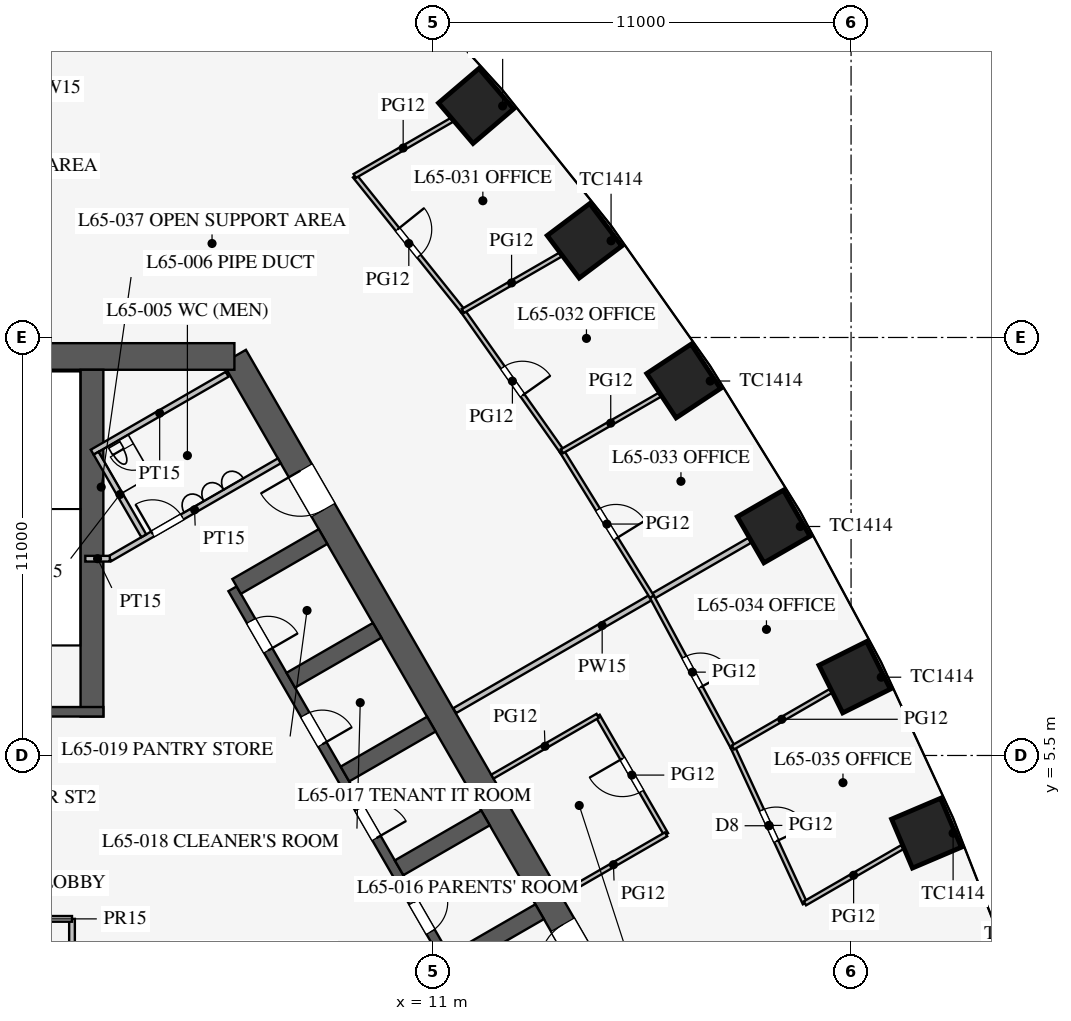
"""IFC4 building model, lengths in metres.
Left out: names, types, materials, properties, quantities, classifications, styles, units other than length and angle.
Written with IfcOpenShell. Run it as: python <this file> out.ifc"""

import sys

from ifc_helpers import new_model, si_unit, direction, frame, frame_2d, origin, origin_2d, place, context, subcontext, project, spatial, rectangle, extrude, element, fill, save


model = new_model("IFC4")
c1 = context("Model", 3, precision=1e-05, world=origin(), true_north=direction((0.0, 1.0)))
c2 = subcontext(c1, "Body", "Model", "MODEL_VIEW")
j1 = project(units=[si_unit("LENGTHUNIT", "METRE"), si_unit("PLANEANGLEUNIT", "RADIAN")], contexts=[c1])
p1 = place(None, origin())
s1 = spatial("IfcSite", under=j1, at=p1, CompositionType="ELEMENT")
p2 = place(p1, origin())
s2 = spatial("IfcBuilding", under=s1, at=p2, CompositionType="ELEMENT")
p3 = place(p2, frame((0.0, 0.0, 284.7)))
s3 = spatial("IfcBuildingStorey", under=s2, at=p3, CompositionType="ELEMENT", Elevation=284.7)
for number, where, z_axis, x_axis in (
    (1, (23.985, 3.455, 0.0), (0.0, 0.0, 1.0), (-0.391, 0.92, 0.0)),
    (2, (22.094, 7.56, 0.0), (0.0, 0.0, 1.0), (-0.447, 0.895, 0.0)),
    (3, (19.963, 11.526, 0.0), (0.0, 0.0, 1.0), (-0.5, 0.866, 0.0)),
    (4, (17.594, 15.354, 0.0), (0.0, 0.0, 1.0), (-0.552, 0.834, 0.0)),
    (5, (14.985, 19.044, 0.0), (0.0, 0.0, 1.0), (-0.601, 0.799, 0.0)),
    (6, (12.132, 22.593, 0.0), (0.0, 0.0, 1.0), (-0.649, 0.761, 0.0)),
):
    element("IfcColumn", number, at=place(p3, frame(where, z_axis=z_axis, x_axis=x_axis)), inside=s3, PredefinedType="COLUMN", context=c2, shape_type="SweptSolid", body=[
        extrude(rectangle(XDim=1.4, YDim=1.4, at=origin_2d()), origin(), (0.0, 0.0, 1.0), 4.2),
    ])
p4 = place(p3, frame((16.743, -3.0, 0.0), z_axis=(0.0, 0.0, 1.0), x_axis=(-0.500002442456, 0.866023993627, 0.0)))
e7 = element("IfcWall", 7, at=p4, inside=s3, PredefinedType="SHEAR", context=c2, shape_type="SweptSolid", body=[
    extrude(rectangle(XDim=21.939, YDim=0.7, at=frame_2d((10.97, 0.0))), origin(), (0.0, 0.0, 1.0), 4.2),
])
p5 = place(p4, frame((17.27, 0.0, 0.0)))
e8 = element("IfcOpeningElement", 8, at=p5, cuts=e7, PredefinedType="OPENING", context=c2, shape_type="SweptSolid", body=[
    extrude(rectangle(XDim=1.2, YDim=2.1, at=frame_2d((0.6, 1.05))), frame((0.0, 0.36, 0.0), z_axis=(0.0, -1.0, 0.0), x_axis=(1.0, 0.0, 0.0)), (0.0, 0.0, 1.0), 0.72),
])
p6 = place(p4, frame((3.47, 0.0, 0.0)))
e9 = element("IfcOpeningElement", 9, at=p6, cuts=e7, PredefinedType="OPENING", context=c2, shape_type="SweptSolid", body=[
    extrude(rectangle(XDim=1.2, YDim=2.1, at=frame_2d((0.6, 1.05))), frame((0.0, 0.36, 0.0), z_axis=(0.0, -1.0, 0.0), x_axis=(1.0, 0.0, 0.0)), (0.0, 0.0, 1.0), 0.72),
])
p7 = place(p3, frame((5.773, 16.0, 0.0), z_axis=(0.0, 0.0, 1.0), x_axis=(-1.0, 0.0, 0.0)))
e10 = element("IfcWall", 10, at=p7, inside=s3, PredefinedType="SHEAR", context=c2, shape_type="SweptSolid", body=[
    extrude(rectangle(XDim=11.547, YDim=0.7, at=frame_2d((5.773, 0.0))), origin(), (0.0, 0.0, 1.0), 4.2),
])
p8 = place(p3, frame((11.424, 0.014, 0.0), z_axis=(0.0, 0.0, 1.0), x_axis=(-0.500001763848, 0.866024385424, 0.0)))
e11 = element("IfcWall", 11, at=p8, inside=s3, PredefinedType="SHEAR", context=c2, shape_type="SweptSolid", body=[
    extrude(rectangle(XDim=11.4, YDim=0.25, at=frame_2d((5.7, 0.0))), origin(), (0.0, 0.0, 1.0), 4.2),
])
p9 = place(p8, frame((0.975, 0.0, 0.0)))
e12 = element("IfcOpeningElement", 12, at=p9, cuts=e11, PredefinedType="OPENING", context=c2, shape_type="SweptSolid", body=[
    extrude(rectangle(XDim=0.9, YDim=2.1, at=frame_2d((0.45, 1.05))), frame((0.0, 0.135, 0.0), z_axis=(0.0, -1.0, 0.0), x_axis=(1.0, 0.0, 0.0)), (0.0, 0.0, 1.0), 0.27),
])
p10 = place(p8, frame((3.825, 0.0, 0.0)))
e13 = element("IfcOpeningElement", 13, at=p10, cuts=e11, PredefinedType="OPENING", context=c2, shape_type="SweptSolid", body=[
    extrude(rectangle(XDim=0.9, YDim=2.1, at=frame_2d((0.45, 1.05))), frame((0.0, 0.135, 0.0), z_axis=(0.0, -1.0, 0.0), x_axis=(1.0, 0.0, 0.0)), (0.0, 0.0, 1.0), 0.27),
])
p11 = place(p8, frame((6.675, 0.0, 0.0)))
e14 = element("IfcOpeningElement", 14, at=p11, cuts=e11, PredefinedType="OPENING", context=c2, shape_type="SweptSolid", body=[
    extrude(rectangle(XDim=0.9, YDim=2.1, at=frame_2d((0.45, 1.05))), frame((0.0, 0.135, 0.0), z_axis=(0.0, -1.0, 0.0), x_axis=(1.0, 0.0, 0.0)), (0.0, 0.0, 1.0), 0.27),
])
p12 = place(p8, frame((9.525, 0.0, 0.0)))
e15 = element("IfcOpeningElement", 15, at=p12, cuts=e11, PredefinedType="OPENING", context=c2, shape_type="SweptSolid", body=[
    extrude(rectangle(XDim=0.9, YDim=2.1, at=frame_2d((0.45, 1.05))), frame((0.0, 0.135, 0.0), z_axis=(0.0, -1.0, 0.0), x_axis=(1.0, 0.0, 0.0)), (0.0, 0.0, 1.0), 0.27),
])
for number, where, z_axis, x_axis in (
    (16, (11.532, 0.076, 0.0), (0.0, 0.0, 1.0), (0.866, 0.5, 0.0)),
    (17, (10.107, 2.544, 0.0), (0.0, 0.0, 1.0), (0.866, 0.5, 0.0)),
    (18, (8.682, 5.012, 0.0), (0.0, 0.0, 1.0), (0.866, 0.5, 0.0)),
    (19, (7.257, 7.481, 0.0), (0.0, 0.0, 1.0), (0.866, 0.5, 0.0)),
    (20, (5.832, 9.949, 0.0), (0.0, 0.0, 1.0), (0.866, 0.5, 0.0)),
):
    element("IfcWall", number, at=place(p3, frame(where, z_axis=z_axis, x_axis=x_axis)), inside=s3, PredefinedType="SHEAR", context=c2, shape_type="SweptSolid", body=[
        extrude(rectangle(XDim=2.625, YDim=0.45, at=frame_2d((1.312, 0.0))), origin(), (0.0, 0.0, 1.0), 4.2),
    ])
p13 = place(p3, frame((2.025, 6.525, 0.0), z_axis=(0.0, 0.0, 1.0), x_axis=(0.0, 1.0, 0.0)))
e21 = element("IfcWall", 21, at=p13, inside=s3, PredefinedType="SHEAR", context=c2, shape_type="SweptSolid", body=[
    extrude(rectangle(XDim=9.125, YDim=0.6, at=frame_2d((4.562, 0.0))), origin(), (0.0, 0.0, 1.0), 4.2),
])
p14 = place(p3, frame((2.325, 6.65, 0.0), z_axis=(0.0, 0.0, 1.0), x_axis=(-1.0, 0.0, 0.0)))
e22 = element("IfcWall", 22, at=p14, inside=s3, PredefinedType="SHEAR", context=c2, shape_type="SweptSolid", body=[
    extrude(rectangle(XDim=4.65, YDim=0.25, at=frame_2d((2.325, 0.0))), origin(), (0.0, 0.0, 1.0), 4.2),
])
p15 = place(p14, frame((1.525, 0.0, 0.0)))
e23 = element("IfcOpeningElement", 23, at=p15, cuts=e22, PredefinedType="OPENING", context=c2, shape_type="SweptSolid", body=[
    extrude(rectangle(XDim=1.6, YDim=2.1, at=frame_2d((0.8, 1.05))), frame((0.0, 0.135, 0.0), z_axis=(0.0, -1.0, 0.0), x_axis=(1.0, 0.0, 0.0)), (0.0, 0.0, 1.0), 0.27),
])
p16 = place(p3, frame((2.495, 10.678, 0.0), z_axis=(0.0, 0.0, 1.0), x_axis=(0.866037967349, 0.499978238636, 0.0)))
e24 = element("IfcWall", 24, at=p16, inside=s3, PredefinedType="PARTITIONING", context=c2, shape_type="SweptSolid", body=[
    extrude(rectangle(XDim=5.15, YDim=0.15, at=frame_2d((2.575, 0.0))), origin(), (0.0, 0.0, 1.0), 4.0),
])
p17 = place(p16, frame((1.3, 0.0, 0.0)))
e25 = element("IfcOpeningElement", 25, at=p17, cuts=e24, PredefinedType="OPENING", context=c2, shape_type="SweptSolid", body=[
    extrude(rectangle(XDim=0.9, YDim=2.1, at=frame_2d((0.45, 1.05))), frame((0.0, 0.085, 0.0), z_axis=(0.0, -1.0, 0.0), x_axis=(1.0, 0.0, 0.0)), (0.0, 0.0, 1.0), 0.17),
])
p18 = place(p3, frame((2.495, 10.678, 0.0), z_axis=(0.0, 0.0, 1.0), x_axis=(-1.0, 0.0, 0.0)))
e26 = element("IfcWall", 26, at=p18, inside=s3, PredefinedType="PARTITIONING", context=c2, shape_type="SweptSolid", body=[
    extrude(rectangle(XDim=0.645, YDim=0.15, at=frame_2d((0.323, 0.0))), origin(), (0.0, 0.0, 1.0), 4.0),
])
p19 = place(p3, frame((2.031, 13.482, 0.0), z_axis=(0.0, 0.0, 1.0), x_axis=(0.866050731258, 0.499956128963, 0.0)))
e27 = element("IfcWall", 27, at=p19, inside=s3, PredefinedType="PARTITIONING", context=c2, shape_type="SweptSolid", body=[
    extrude(rectangle(XDim=4.1, YDim=0.15, at=frame_2d((2.05, 0.0))), origin(), (0.0, 0.0, 1.0), 4.0),
])
p20 = place(p3, frame((3.389, 11.281, 0.0), z_axis=(0.0, 0.0, 1.0), x_axis=(-0.499989096993, 0.866031698547, 0.0)))
e28 = element("IfcWall", 28, at=p20, inside=s3, PredefinedType="PARTITIONING", context=c2, shape_type="SweptSolid", body=[
    extrude(rectangle(XDim=2.51, YDim=0.15, at=frame_2d((1.255, 0.0))), origin(), (0.0, 0.0, 1.0), 4.0),
])
p21 = place(p3, frame((1.5, -1.2, 0.0), z_axis=(0.0, 0.0, 1.0), x_axis=(0.0, 1.0, 0.0)))
e29 = element("IfcWall", 29, at=p21, inside=s3, PredefinedType="PARTITIONING", context=c2, shape_type="SweptSolid", body=[
    extrude(rectangle(XDim=2.4, YDim=0.15, at=frame_2d((1.2, 0.0))), origin(), (0.0, 0.0, 1.0), 4.0),
])
p22 = place(p3, frame((1.5, 1.2, 0.0), z_axis=(0.0, 0.0, 1.0), x_axis=(-1.0, 0.0, 0.0)))
e30 = element("IfcWall", 30, at=p22, inside=s3, PredefinedType="PARTITIONING", context=c2, shape_type="SweptSolid", body=[
    extrude(rectangle(XDim=3.0, YDim=0.15, at=frame_2d((1.5, 0.0))), origin(), (0.0, 0.0, 1.0), 4.0),
])
p23 = place(p3, frame((11.57, 6.68, 0.0), z_axis=(0.0, 0.0, 1.0), x_axis=(0.866018180823, 0.500012510328, 0.0)))
e31 = element("IfcWall", 31, at=p23, inside=s3, PredefinedType="PARTITIONING", context=c2, shape_type="SweptSolid", body=[
    extrude(rectangle(XDim=8.962, YDim=0.15, at=frame_2d((4.481, 0.0))), origin(), (0.0, 0.0, 1.0), 3.0),
])
p24 = place(p3, frame((17.133, 3.425, 0.0), z_axis=(0.0, 0.0, 1.0), x_axis=(-0.500012057535, 0.866018442252, 0.0)))
e32 = element("IfcWall", 32, at=p24, inside=s3, PredefinedType="PARTITIONING", context=c2, shape_type="SweptSolid", body=[
    extrude(rectangle(XDim=3.6, YDim=0.12, at=frame_2d((1.8, 0.0))), origin(), (0.0, 0.0, 1.0), 2.9),
])
p25 = place(p24, frame((1.3, 0.0, 0.15)))
e33 = element("IfcOpeningElement", 33, at=p25, cuts=e32, PredefinedType="OPENING", context=c2, shape_type="SweptSolid", body=[
    extrude(rectangle(XDim=1.0, YDim=2.1, at=frame_2d((0.5, 1.05))), frame((0.0, 0.07, 0.0), z_axis=(0.0, -1.0, 0.0), x_axis=(1.0, 0.0, 0.0)), (0.0, 0.0, 1.0), 0.14),
])
p26 = place(p3, frame((12.562, 4.943, 0.0), z_axis=(0.0, 0.0, 1.0), x_axis=(0.866008981251, 0.500028443584, 0.0)))
e34 = element("IfcWall", 34, at=p26, inside=s3, PredefinedType="PARTITIONING", context=c2, shape_type="SweptSolid", body=[
    extrude(rectangle(XDim=3.2, YDim=0.12, at=frame_2d((1.6, 0.0))), origin(), (0.0, 0.0, 1.0), 2.9),
])
p27 = place(p3, frame((14.361, 1.825, 0.0), z_axis=(0.0, 0.0, 1.0), x_axis=(0.866028054938, 0.499995408039, 0.0)))
e35 = element("IfcWall", 35, at=p27, inside=s3, PredefinedType="PARTITIONING", context=c2, shape_type="SweptSolid", body=[
    extrude(rectangle(XDim=3.2, YDim=0.12, at=frame_2d((1.6, 0.0))), origin(), (0.0, 0.0, 1.0), 2.9),
])
p28 = place(p3, frame((16.759, 9.676, 0.0), z_axis=(0.0, 0.0, 1.0), x_axis=(-0.525996140194, 0.850486954927, 0.0)))
e36 = element("IfcWall", 36, at=p28, inside=s3, PredefinedType="PARTITIONING", context=c2, shape_type="SweptSolid", body=[
    extrude(rectangle(XDim=4.502, YDim=0.12, at=frame_2d((2.251, 0.0))), origin(), (0.0, 0.0, 1.0), 2.9),
])
p29 = place(p28, frame((1.8, 0.0, 0.15)))
e37 = element("IfcOpeningElement", 37, at=p29, cuts=e36, PredefinedType="OPENING", context=c2, shape_type="SweptSolid", body=[
    extrude(rectangle(XDim=0.9, YDim=2.1, at=frame_2d((0.45, 1.05))), frame((0.0, 0.07, 0.0), z_axis=(0.0, -1.0, 0.0), x_axis=(1.0, 0.0, 0.0)), (0.0, 0.0, 1.0), 0.14),
])
p30 = place(p3, frame((14.391, 13.505, 0.0), z_axis=(0.0, 0.0, 1.0), x_axis=(-0.576562277172, 0.817053205454, 0.0)))
e38 = element("IfcWall", 38, at=p30, inside=s3, PredefinedType="PARTITIONING", context=c2, shape_type="SweptSolid", body=[
    extrude(rectangle(XDim=4.519, YDim=0.12, at=frame_2d((2.259, 0.0))), origin(), (0.0, 0.0, 1.0), 2.9),
])
p31 = place(p30, frame((1.8, 0.0, 0.15)))
e39 = element("IfcOpeningElement", 39, at=p31, cuts=e38, PredefinedType="OPENING", context=c2, shape_type="SweptSolid", body=[
    extrude(rectangle(XDim=0.9, YDim=2.1, at=frame_2d((0.45, 1.05))), frame((0.0, 0.07, 0.0), z_axis=(0.0, -1.0, 0.0), x_axis=(1.0, 0.0, 0.0)), (0.0, 0.0, 1.0), 0.14),
])
p32 = place(p3, frame((11.786, 17.197, 0.0), z_axis=(0.0, 0.0, 1.0), x_axis=(-0.625263875383, 0.780413407202, 0.0)))
e40 = element("IfcWall", 40, at=p32, inside=s3, PredefinedType="PARTITIONING", context=c2, shape_type="SweptSolid", body=[
    extrude(rectangle(XDim=4.552, YDim=0.12, at=frame_2d((2.276, 0.0))), origin(), (0.0, 0.0, 1.0), 2.9),
])
p33 = place(p32, frame((1.85, 0.0, 0.15)))
e41 = element("IfcOpeningElement", 41, at=p33, cuts=e40, PredefinedType="OPENING", context=c2, shape_type="SweptSolid", body=[
    extrude(rectangle(XDim=0.9, YDim=2.1, at=frame_2d((0.45, 1.05))), frame((0.0, 0.07, 0.0), z_axis=(0.0, -1.0, 0.0), x_axis=(1.0, 0.0, 0.0)), (0.0, 0.0, 1.0), 0.14),
])
p34 = place(p3, frame((18.891, 5.71, 0.0), z_axis=(0.0, 0.0, 1.0), x_axis=(-0.473524102582, 0.880780860529, 0.0)))
e42 = element("IfcWall", 42, at=p34, inside=s3, PredefinedType="PARTITIONING", context=c2, shape_type="SweptSolid", body=[
    extrude(rectangle(XDim=4.502, YDim=0.12, at=frame_2d((2.251, 0.0))), origin(), (0.0, 0.0, 1.0), 2.9),
])
p35 = place(p34, frame((1.8, 0.0, 0.15)))
e43 = element("IfcOpeningElement", 43, at=p35, cuts=e42, PredefinedType="OPENING", context=c2, shape_type="SweptSolid", body=[
    extrude(rectangle(XDim=0.9, YDim=2.1, at=frame_2d((0.45, 1.05))), frame((0.0, 0.07, 0.0), z_axis=(0.0, -1.0, 0.0), x_axis=(1.0, 0.0, 0.0)), (0.0, 0.0, 1.0), 0.14),
])
p36 = place(p3, frame((20.786, 1.608, 0.0), z_axis=(0.0, 0.0, 1.0), x_axis=(-0.419335693458, 0.907831248742, 0.0)))
e44 = element("IfcWall", 44, at=p36, inside=s3, PredefinedType="PARTITIONING", context=c2, shape_type="SweptSolid", body=[
    extrude(rectangle(XDim=4.519, YDim=0.12, at=frame_2d((2.259, 0.0))), origin(), (0.0, 0.0, 1.0), 2.9),
])
p37 = place(p36, frame((1.8, 0.0, 0.15)))
e45 = element("IfcOpeningElement", 45, at=p37, cuts=e44, PredefinedType="OPENING", context=c2, shape_type="SweptSolid", body=[
    extrude(rectangle(XDim=0.9, YDim=2.1, at=frame_2d((0.45, 1.05))), frame((0.0, 0.07, 0.0), z_axis=(0.0, -1.0, 0.0), x_axis=(1.0, 0.0, 0.0)), (0.0, 0.0, 1.0), 0.14),
])
p38 = place(p3, frame((8.939, 20.75, 0.0), z_axis=(0.0, 0.0, 1.0), x_axis=(0.866019881867, 0.500009564119, 0.0)))
e46 = element("IfcWall", 46, at=p38, inside=s3, PredefinedType="PARTITIONING", context=c2, shape_type="SweptSolid", body=[
    extrude(rectangle(XDim=2.944, YDim=0.12, at=frame_2d((1.472, 0.0))), origin(), (0.0, 0.0, 1.0), 2.8),
])
p39 = place(p3, frame((14.391, 13.505, 0.0), z_axis=(0.0, 0.0, 1.0), x_axis=(0.866067759775, 0.499926630096, 0.0)))
e47 = element("IfcWall", 47, at=p39, inside=s3, PredefinedType="PARTITIONING", context=c2, shape_type="SweptSolid", body=[
    extrude(rectangle(XDim=2.967, YDim=0.12, at=frame_2d((1.484, 0.0))), origin(), (0.0, 0.0, 1.0), 2.9),
])
p40 = place(p3, frame((11.786, 17.197, 0.0), z_axis=(0.0, 0.0, 1.0), x_axis=(0.866056430242, 0.499946256749, 0.0)))
e48 = element("IfcWall", 48, at=p40, inside=s3, PredefinedType="PARTITIONING", context=c2, shape_type="SweptSolid", body=[
    extrude(rectangle(XDim=2.959, YDim=0.12, at=frame_2d((1.479, 0.0))), origin(), (0.0, 0.0, 1.0), 2.9),
])
p41 = place(p3, frame((18.891, 5.71, 0.0), z_axis=(0.0, 0.0, 1.0), x_axis=(0.866032134716, 0.499988341504, 0.0)))
e49 = element("IfcWall", 49, at=p41, inside=s3, PredefinedType="PARTITIONING", context=c2, shape_type="SweptSolid", body=[
    extrude(rectangle(XDim=2.967, YDim=0.12, at=frame_2d((1.484, 0.0))), origin(), (0.0, 0.0, 1.0), 2.9),
])
p42 = place(p3, frame((20.786, 1.608, 0.0), z_axis=(0.0, 0.0, 1.0), x_axis=(0.866056430242, 0.499946256749, 0.0)))
e50 = element("IfcWall", 50, at=p42, inside=s3, PredefinedType="PARTITIONING", context=c2, shape_type="SweptSolid", body=[
    extrude(rectangle(XDim=2.959, YDim=0.12, at=frame_2d((1.479, 0.0))), origin(), (0.0, 0.0, 1.0), 2.9),
])
p43 = place(p17, origin())
e51 = element("IfcDoor", 51, at=p43, inside=s3, OperationType="SINGLE_SWING_LEFT", PredefinedType="DOOR", context=c2, shape_type="SweptSolid", body=[
    extrude(rectangle(XDim=0.9, YDim=2.1, at=frame_2d((0.45, 1.05))), frame((0.0, 0.025, 0.0), z_axis=(0.0, -1.0, 0.0), x_axis=(1.0, 0.0, 0.0)), (0.0, 0.0, 1.0), 0.05),
])
fill(e25, e51)
p44 = place(p5, origin())
e52 = element("IfcDoor", 52, at=p44, inside=s3, OperationType="SINGLE_SWING_RIGHT", PredefinedType="DOOR", context=c2, shape_type="SweptSolid", body=[
    extrude(rectangle(XDim=1.2, YDim=2.1, at=frame_2d((0.6, 1.05))), frame((0.0, 0.025, 0.0), z_axis=(0.0, -1.0, 0.0), x_axis=(1.0, 0.0, 0.0)), (0.0, 0.0, 1.0), 0.05),
])
fill(e8, e52)
p45 = place(p6, origin())
e53 = element("IfcDoor", 53, at=p45, inside=s3, OperationType="SINGLE_SWING_LEFT", PredefinedType="DOOR", context=c2, shape_type="SweptSolid", body=[
    extrude(rectangle(XDim=1.2, YDim=2.1, at=frame_2d((0.6, 1.05))), frame((0.0, 0.025, 0.0), z_axis=(0.0, -1.0, 0.0), x_axis=(1.0, 0.0, 0.0)), (0.0, 0.0, 1.0), 0.05),
])
fill(e9, e53)
p46 = place(p9, frame((0.9, 0.0, 0.0), z_axis=(0.0, 0.0, 1.0), x_axis=(-1.0, 0.0, 0.0)))
e54 = element("IfcDoor", 54, at=p46, inside=s3, OperationType="SINGLE_SWING_LEFT", PredefinedType="DOOR", context=c2, shape_type="SweptSolid", body=[
    extrude(rectangle(XDim=0.9, YDim=2.1, at=frame_2d((0.45, 1.05))), frame((0.0, 0.025, 0.0), z_axis=(0.0, -1.0, 0.0), x_axis=(1.0, 0.0, 0.0)), (0.0, 0.0, 1.0), 0.05),
])
fill(e12, e54)
p47 = place(p10, frame((0.9, 0.0, 0.0), z_axis=(0.0, 0.0, 1.0), x_axis=(-1.0, 0.0, 0.0)))
e55 = element("IfcDoor", 55, at=p47, inside=s3, OperationType="SINGLE_SWING_RIGHT", PredefinedType="DOOR", context=c2, shape_type="SweptSolid", body=[
    extrude(rectangle(XDim=0.9, YDim=2.1, at=frame_2d((0.45, 1.05))), frame((0.0, 0.025, 0.0), z_axis=(0.0, -1.0, 0.0), x_axis=(1.0, 0.0, 0.0)), (0.0, 0.0, 1.0), 0.05),
])
fill(e13, e55)
p48 = place(p11, frame((0.9, 0.0, 0.0), z_axis=(0.0, 0.0, 1.0), x_axis=(-1.0, 0.0, 0.0)))
e56 = element("IfcDoor", 56, at=p48, inside=s3, OperationType="SINGLE_SWING_RIGHT", PredefinedType="DOOR", context=c2, shape_type="SweptSolid", body=[
    extrude(rectangle(XDim=0.9, YDim=2.1, at=frame_2d((0.45, 1.05))), frame((0.0, 0.025, 0.0), z_axis=(0.0, -1.0, 0.0), x_axis=(1.0, 0.0, 0.0)), (0.0, 0.0, 1.0), 0.05),
])
fill(e14, e56)
p49 = place(p12, frame((0.9, 0.0, 0.0), z_axis=(0.0, 0.0, 1.0), x_axis=(-1.0, 0.0, 0.0)))
e57 = element("IfcDoor", 57, at=p49, inside=s3, OperationType="SINGLE_SWING_RIGHT", PredefinedType="DOOR", context=c2, shape_type="SweptSolid", body=[
    extrude(rectangle(XDim=0.9, YDim=2.1, at=frame_2d((0.45, 1.05))), frame((0.0, 0.025, 0.0), z_axis=(0.0, -1.0, 0.0), x_axis=(1.0, 0.0, 0.0)), (0.0, 0.0, 1.0), 0.05),
])
fill(e15, e57)
p50 = place(p25, origin())
e58 = element("IfcDoor", 58, at=p50, inside=s3, OperationType="SINGLE_SWING_RIGHT", PredefinedType="DOOR", context=c2, shape_type="SweptSolid", body=[
    extrude(rectangle(XDim=1.0, YDim=2.1, at=frame_2d((0.5, 1.05))), frame((0.0, 0.025, 0.0), z_axis=(0.0, -1.0, 0.0), x_axis=(1.0, 0.0, 0.0)), (0.0, 0.0, 1.0), 0.05),
])
fill(e33, e58)
p51 = place(p33, frame((0.9, 0.0, 0.0), z_axis=(0.0, 0.0, 1.0), x_axis=(-1.0, 0.0, 0.0)))
e59 = element("IfcDoor", 59, at=p51, inside=s3, OperationType="SINGLE_SWING_LEFT", PredefinedType="DOOR", context=c2, shape_type="SweptSolid", body=[
    extrude(rectangle(XDim=0.9, YDim=2.1, at=frame_2d((0.45, 1.05))), frame((0.0, 0.025, 0.0), z_axis=(0.0, -1.0, 0.0), x_axis=(1.0, 0.0, 0.0)), (0.0, 0.0, 1.0), 0.05),
])
fill(e41, e59)
p52 = place(p31, frame((0.9, 0.0, 0.0), z_axis=(0.0, 0.0, 1.0), x_axis=(-1.0, 0.0, 0.0)))
e60 = element("IfcDoor", 60, at=p52, inside=s3, OperationType="SINGLE_SWING_RIGHT", PredefinedType="DOOR", context=c2, shape_type="SweptSolid", body=[
    extrude(rectangle(XDim=0.9, YDim=2.1, at=frame_2d((0.45, 1.05))), frame((0.0, 0.025, 0.0), z_axis=(0.0, -1.0, 0.0), x_axis=(1.0, 0.0, 0.0)), (0.0, 0.0, 1.0), 0.05),
])
fill(e39, e60)
p53 = place(p29, frame((0.9, 0.0, 0.0), z_axis=(0.0, 0.0, 1.0), x_axis=(-1.0, 0.0, 0.0)))
e61 = element("IfcDoor", 61, at=p53, inside=s3, OperationType="SINGLE_SWING_RIGHT", PredefinedType="DOOR", context=c2, shape_type="SweptSolid", body=[
    extrude(rectangle(XDim=0.9, YDim=2.1, at=frame_2d((0.45, 1.05))), frame((0.0, 0.025, 0.0), z_axis=(0.0, -1.0, 0.0), x_axis=(1.0, 0.0, 0.0)), (0.0, 0.0, 1.0), 0.05),
])
fill(e37, e61)
p54 = place(p35, frame((0.9, 0.0, 0.0), z_axis=(0.0, 0.0, 1.0), x_axis=(-1.0, 0.0, 0.0)))
e62 = element("IfcDoor", 62, at=p54, inside=s3, OperationType="SINGLE_SWING_RIGHT", PredefinedType="DOOR", context=c2, shape_type="SweptSolid", body=[
    extrude(rectangle(XDim=0.9, YDim=2.1, at=frame_2d((0.45, 1.05))), frame((0.0, 0.025, 0.0), z_axis=(0.0, -1.0, 0.0), x_axis=(1.0, 0.0, 0.0)), (0.0, 0.0, 1.0), 0.05),
])
fill(e43, e62)
p55 = place(p37, frame((0.9, 0.0, 0.0), z_axis=(0.0, 0.0, 1.0), x_axis=(-1.0, 0.0, 0.0)))
e63 = element("IfcDoor", 63, at=p55, inside=s3, OperationType="SINGLE_SWING_RIGHT", PredefinedType="DOOR", context=c2, shape_type="SweptSolid", body=[
    extrude(rectangle(XDim=0.9, YDim=2.1, at=frame_2d((0.45, 1.05))), frame((0.0, 0.025, 0.0), z_axis=(0.0, -1.0, 0.0), x_axis=(1.0, 0.0, 0.0)), (0.0, 0.0, 1.0), 0.05),
])
fill(e45, e63)
save(model, sys.argv[1])
